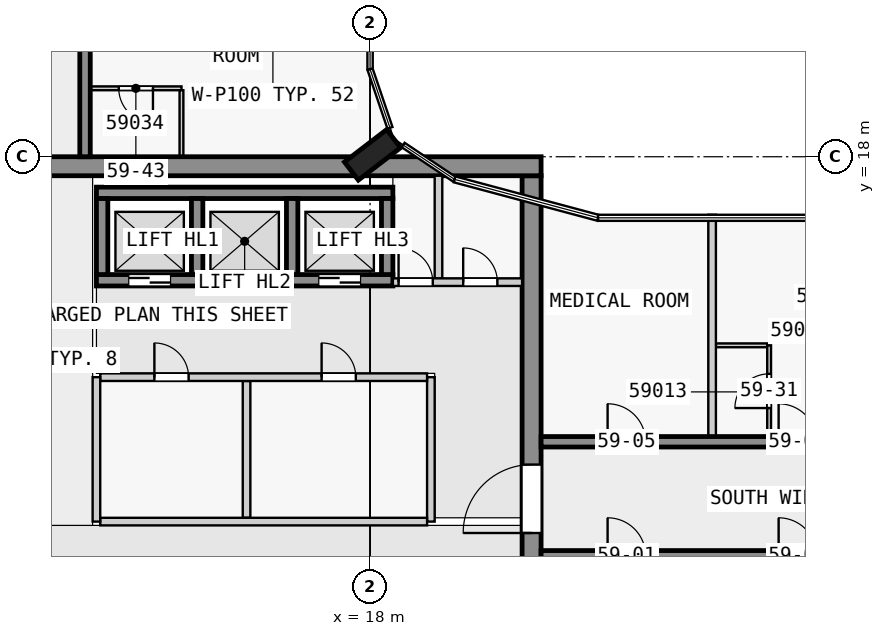
"""IFC4 building model, lengths in metres.
Left out: names, types, materials, properties, quantities, classifications, styles, units other than length and angle.
Written with IfcOpenShell. Run it as: python <this file> out.ifc"""

import sys

from ifc_helpers import new_model, si_unit, direction, frame, frame_2d, origin, origin_2d, place, context, subcontext, project, spatial, rectangle, extrude, element, fill, save


model = new_model("IFC4")
c1 = context("Model", 3, precision=1e-05, world=origin(), true_north=direction((0.0, 1.0)))
c2 = subcontext(c1, "Body", "Model", "MODEL_VIEW")
j1 = project(units=[si_unit("LENGTHUNIT", "METRE"), si_unit("PLANEANGLEUNIT", "RADIAN")], contexts=[c1])
p1 = place(None, origin())
s1 = spatial("IfcSite", under=j1, at=p1, CompositionType="ELEMENT")
p2 = place(p1, origin())
s2 = spatial("IfcBuilding", under=s1, at=p2, CompositionType="ELEMENT")
p3 = place(p2, frame((0.0, 0.0, 225.9)))
s3 = spatial("IfcBuildingStorey", under=s2, at=p3, CompositionType="ELEMENT", Elevation=225.9)
p4 = place(p3, frame((18.065, 18.05, 0.0), z_axis=(0.0, 0.0, 1.0), x_axis=(-0.608810846443, 0.793315418515, 0.0)))
e1 = element("IfcColumn", 1, at=p4, inside=s3, PredefinedType="COLUMN", context=c2, shape_type="SweptSolid", body=[
    extrude(rectangle(XDim=0.6, YDim=1.4, at=origin_2d()), origin(), (0.0, 0.0, 1.0), 3.5),
])
p5 = place(p3, frame((1.38, 17.75, 0.0), z_axis=(0.0, 0.0, 1.0), x_axis=(1.0, 0.0, 0.0)))
e2 = element("IfcWall", 2, at=p5, inside=s3, PredefinedType="SHEAR", context=c2, shape_type="SweptSolid", body=[
    extrude(rectangle(XDim=21.12, YDim=0.5, at=frame_2d((10.56, 0.0))), origin(), (0.0, 0.0, 1.0), 3.05),
])
p6 = place(p5, frame((6.3, 0.0, 0.0)))
e3 = element("IfcOpeningElement", 3, at=p6, cuts=e2, PredefinedType="OPENING", context=c2, shape_type="SweptSolid", body=[
    extrude(rectangle(XDim=1.8, YDim=2.1, at=frame_2d((0.9, 1.05))), frame((0.0, 0.26, 0.0), z_axis=(0.0, -1.0, 0.0), x_axis=(1.0, 0.0, 0.0)), (0.0, 0.0, 1.0), 0.52),
])
p7 = place(p3, frame((22.25, 2.5, 0.0), z_axis=(0.0, 0.0, 1.0), x_axis=(0.0, 1.0, 0.0)))
e4 = element("IfcWall", 4, at=p7, inside=s3, PredefinedType="SHEAR", context=c2, shape_type="SweptSolid", body=[
    extrude(rectangle(XDim=15.0, YDim=0.5, at=frame_2d((7.5, 0.0))), origin(), (0.0, 0.0, 1.0), 3.05),
])
p8 = place(p7, frame((5.6, 0.0, 0.0)))
e5 = element("IfcOpeningElement", 5, at=p8, cuts=e4, PredefinedType="OPENING", context=c2, shape_type="SweptSolid", body=[
    extrude(rectangle(XDim=1.8, YDim=2.1, at=frame_2d((0.9, 1.05))), frame((0.0, 0.26, 0.0), z_axis=(0.0, -1.0, 0.0), x_axis=(1.0, 0.0, 0.0)), (0.0, 0.0, 1.0), 0.52),
])
p9 = place(p3, frame((10.8, 17.05, 0.0), z_axis=(0.0, 0.0, 1.0), x_axis=(1.0, 0.0, 0.0)))
e6 = element("IfcWall", 6, at=p9, inside=s3, PredefinedType="SHEAR", context=c2, shape_type="SweptSolid", body=[
    extrude(rectangle(XDim=7.8, YDim=0.3, at=frame_2d((3.9, 0.0))), origin(), (0.0, 0.0, 1.0), 3.05),
])
p10 = place(p3, frame((10.8, 14.75, 0.0), z_axis=(0.0, 0.0, 1.0), x_axis=(1.0, 0.0, 0.0)))
e7 = element("IfcWall", 7, at=p10, inside=s3, PredefinedType="SHEAR", context=c2, shape_type="SweptSolid", body=[
    extrude(rectangle(XDim=7.8, YDim=0.3, at=frame_2d((3.9, 0.0))), origin(), (0.0, 0.0, 1.0), 3.05),
])
p11 = place(p10, frame((0.85, 0.0, 0.0)))
e8 = element("IfcOpeningElement", 8, at=p11, cuts=e7, PredefinedType="OPENING", context=c2, shape_type="SweptSolid", body=[
    extrude(rectangle(XDim=1.1, YDim=2.1, at=frame_2d((0.55, 1.05))), frame((0.0, 0.16, 0.0), z_axis=(0.0, -1.0, 0.0), x_axis=(1.0, 0.0, 0.0)), (0.0, 0.0, 1.0), 0.32),
])
p12 = place(p10, frame((3.35, 0.0, 0.0)))
e9 = element("IfcOpeningElement", 9, at=p12, cuts=e7, PredefinedType="OPENING", context=c2, shape_type="SweptSolid", body=[
    extrude(rectangle(XDim=1.1, YDim=2.1, at=frame_2d((0.55, 1.05))), frame((0.0, 0.16, 0.0), z_axis=(0.0, -1.0, 0.0), x_axis=(1.0, 0.0, 0.0)), (0.0, 0.0, 1.0), 0.32),
])
p13 = place(p10, frame((5.85, 0.0, 0.0)))
e10 = element("IfcOpeningElement", 10, at=p13, cuts=e7, PredefinedType="OPENING", context=c2, shape_type="SweptSolid", body=[
    extrude(rectangle(XDim=1.1, YDim=2.1, at=frame_2d((0.55, 1.05))), frame((0.0, 0.16, 0.0), z_axis=(0.0, -1.0, 0.0), x_axis=(1.0, 0.0, 0.0)), (0.0, 0.0, 1.0), 0.32),
])
for number, where, z_axis, x_axis in (
    (11, (10.95, 14.9, 0.0), (0.0, 0.0, 1.0), (0.0, 1.0, 0.0)),
    (12, (13.45, 14.9, 0.0), (0.0, 0.0, 1.0), (0.0, 1.0, 0.0)),
    (13, (15.95, 14.9, 0.0), (0.0, 0.0, 1.0), (0.0, 1.0, 0.0)),
    (14, (18.45, 14.9, 0.0), (0.0, 0.0, 1.0), (0.0, 1.0, 0.0)),
):
    element("IfcWall", number, at=place(p3, frame(where, z_axis=z_axis, x_axis=x_axis)), inside=s3, PredefinedType="SHEAR", context=c2, shape_type="SweptSolid", body=[
        extrude(rectangle(XDim=2.0, YDim=0.3, at=frame_2d((1.0, 0.0))), origin(), (0.0, 0.0, 1.0), 3.05),
    ])
p14 = place(p3, frame((22.5, 7.5, 0.0), z_axis=(0.0, 0.0, 1.0), x_axis=(1.0, 0.0, 0.0)))
e15 = element("IfcWall", 15, at=p14, inside=s3, PredefinedType="SHEAR", context=c2, shape_type="SweptSolid", body=[
    extrude(rectangle(XDim=22.5, YDim=0.275, at=frame_2d((11.25, 0.0))), origin(), (0.0, 0.0, 1.0), 3.05),
])
p15 = place(p14, frame((1.75, 0.0, 0.0)))
e16 = element("IfcOpeningElement", 16, at=p15, cuts=e15, PredefinedType="OPENING", context=c2, shape_type="SweptSolid", body=[
    extrude(rectangle(XDim=1.0, YDim=2.1, at=frame_2d((0.5, 1.05))), frame((0.0, 0.147, 0.0), z_axis=(0.0, -1.0, 0.0), x_axis=(1.0, 0.0, 0.0)), (0.0, 0.0, 1.0), 0.295),
])
p16 = place(p14, frame((6.25, 0.0, 0.0)))
e17 = element("IfcOpeningElement", 17, at=p16, cuts=e15, PredefinedType="OPENING", context=c2, shape_type="SweptSolid", body=[
    extrude(rectangle(XDim=1.0, YDim=2.1, at=frame_2d((0.5, 1.05))), frame((0.0, 0.147, 0.0), z_axis=(0.0, -1.0, 0.0), x_axis=(1.0, 0.0, 0.0)), (0.0, 0.0, 1.0), 0.295),
])
p17 = place(p14, frame((10.75, 0.0, 0.0)))
e18 = element("IfcOpeningElement", 18, at=p17, cuts=e15, PredefinedType="OPENING", context=c2, shape_type="SweptSolid", body=[
    extrude(rectangle(XDim=1.0, YDim=2.1, at=frame_2d((0.5, 1.05))), frame((0.0, 0.147, 0.0), z_axis=(0.0, -1.0, 0.0), x_axis=(1.0, 0.0, 0.0)), (0.0, 0.0, 1.0), 0.295),
])
p18 = place(p14, frame((16.85, 0.0, 0.0)))
e19 = element("IfcOpeningElement", 19, at=p18, cuts=e15, PredefinedType="OPENING", context=c2, shape_type="SweptSolid", body=[
    extrude(rectangle(XDim=1.0, YDim=2.1, at=frame_2d((0.5, 1.05))), frame((0.0, 0.147, 0.0), z_axis=(0.0, -1.0, 0.0), x_axis=(1.0, 0.0, 0.0)), (0.0, 0.0, 1.0), 0.295),
])
p19 = place(p3, frame((22.5, 10.5, 0.0), z_axis=(0.0, 0.0, 1.0), x_axis=(1.0, 0.0, 0.0)))
e20 = element("IfcWall", 20, at=p19, inside=s3, PredefinedType="SHEAR", context=c2, shape_type="SweptSolid", body=[
    extrude(rectangle(XDim=22.5, YDim=0.275, at=frame_2d((11.25, 0.0))), origin(), (0.0, 0.0, 1.0), 3.05),
])
p20 = place(p19, frame((1.75, 0.0, 0.0)))
e21 = element("IfcOpeningElement", 21, at=p20, cuts=e20, PredefinedType="OPENING", context=c2, shape_type="SweptSolid", body=[
    extrude(rectangle(XDim=1.0, YDim=2.1, at=frame_2d((0.5, 1.05))), frame((0.0, 0.147, 0.0), z_axis=(0.0, -1.0, 0.0), x_axis=(1.0, 0.0, 0.0)), (0.0, 0.0, 1.0), 0.295),
])
p21 = place(p19, frame((6.25, 0.0, 0.0)))
e22 = element("IfcOpeningElement", 22, at=p21, cuts=e20, PredefinedType="OPENING", context=c2, shape_type="SweptSolid", body=[
    extrude(rectangle(XDim=1.0, YDim=2.1, at=frame_2d((0.5, 1.05))), frame((0.0, 0.147, 0.0), z_axis=(0.0, -1.0, 0.0), x_axis=(1.0, 0.0, 0.0)), (0.0, 0.0, 1.0), 0.295),
])
p22 = place(p19, frame((10.35, 0.0, 0.0)))
e23 = element("IfcOpeningElement", 23, at=p22, cuts=e20, PredefinedType="OPENING", context=c2, shape_type="SweptSolid", body=[
    extrude(rectangle(XDim=1.8, YDim=2.1, at=frame_2d((0.9, 1.05))), frame((0.0, 0.147, 0.0), z_axis=(0.0, -1.0, 0.0), x_axis=(1.0, 0.0, 0.0)), (0.0, 0.0, 1.0), 0.295),
])
p23 = place(p19, frame((15.25, 0.0, 0.0)))
e24 = element("IfcOpeningElement", 24, at=p23, cuts=e20, PredefinedType="OPENING", context=c2, shape_type="SweptSolid", body=[
    extrude(rectangle(XDim=1.0, YDim=2.1, at=frame_2d((0.5, 1.05))), frame((0.0, 0.147, 0.0), z_axis=(0.0, -1.0, 0.0), x_axis=(1.0, 0.0, 0.0)), (0.0, 0.0, 1.0), 0.295),
])
p24 = place(p19, frame((18.75, 0.0, 0.0)))
e25 = element("IfcOpeningElement", 25, at=p24, cuts=e20, PredefinedType="OPENING", context=c2, shape_type="SweptSolid", body=[
    extrude(rectangle(XDim=0.9, YDim=2.1, at=frame_2d((0.45, 1.05))), frame((0.0, 0.147, 0.0), z_axis=(0.0, -1.0, 0.0), x_axis=(1.0, 0.0, 0.0)), (0.0, 0.0, 1.0), 0.295),
])
p25 = place(p19, frame((20.95, 0.0, 0.0)))
e26 = element("IfcOpeningElement", 26, at=p25, cuts=e20, PredefinedType="OPENING", context=c2, shape_type="SweptSolid", body=[
    extrude(rectangle(XDim=1.0, YDim=2.1, at=frame_2d((0.5, 1.05))), frame((0.0, 0.147, 0.0), z_axis=(0.0, -1.0, 0.0), x_axis=(1.0, 0.0, 0.0)), (0.0, 0.0, 1.0), 0.295),
])
p26 = place(p3, frame((10.5, 18.0, 0.0), z_axis=(0.0, 0.0, 1.0), x_axis=(0.0, 1.0, 0.0)))
e27 = element("IfcWall", 27, at=p26, inside=s3, PredefinedType="SHEAR", context=c2, shape_type="SweptSolid", body=[
    extrude(rectangle(XDim=27.0, YDim=0.275, at=frame_2d((13.5, 0.0))), origin(), (0.0, 0.0, 1.0), 3.05),
])
p27 = place(p26, frame((4.05, 0.0, 0.0)))
e28 = element("IfcOpeningElement", 28, at=p27, cuts=e27, PredefinedType="OPENING", context=c2, shape_type="SweptSolid", body=[
    extrude(rectangle(XDim=1.0, YDim=2.1, at=frame_2d((0.5, 1.05))), frame((0.0, 0.147, 0.0), z_axis=(0.0, -1.0, 0.0), x_axis=(1.0, 0.0, 0.0)), (0.0, 0.0, 1.0), 0.295),
])
p28 = place(p26, frame((10.35, 0.0, 0.0)))
e29 = element("IfcOpeningElement", 29, at=p28, cuts=e27, PredefinedType="OPENING", context=c2, shape_type="SweptSolid", body=[
    extrude(rectangle(XDim=1.8, YDim=2.1, at=frame_2d((0.9, 1.05))), frame((0.0, 0.147, 0.0), z_axis=(0.0, -1.0, 0.0), x_axis=(1.0, 0.0, 0.0)), (0.0, 0.0, 1.0), 0.295),
])
p29 = place(p26, frame((15.25, 0.0, 0.0)))
e30 = element("IfcOpeningElement", 30, at=p29, cuts=e27, PredefinedType="OPENING", context=c2, shape_type="SweptSolid", body=[
    extrude(rectangle(XDim=1.0, YDim=2.1, at=frame_2d((0.5, 1.05))), frame((0.0, 0.147, 0.0), z_axis=(0.0, -1.0, 0.0), x_axis=(1.0, 0.0, 0.0)), (0.0, 0.0, 1.0), 0.295),
])
p30 = place(p26, frame((21.35, 0.0, 0.0)))
e31 = element("IfcOpeningElement", 31, at=p30, cuts=e27, PredefinedType="OPENING", context=c2, shape_type="SweptSolid", body=[
    extrude(rectangle(XDim=1.0, YDim=2.1, at=frame_2d((0.5, 1.05))), frame((0.0, 0.147, 0.0), z_axis=(0.0, -1.0, 0.0), x_axis=(1.0, 0.0, 0.0)), (0.0, 0.0, 1.0), 0.295),
])
p31 = place(p3, frame((10.8, 8.4, 0.0), z_axis=(0.0, 0.0, 1.0), x_axis=(0.0, 1.0, 0.0)))
e32 = element("IfcWall", 32, at=p31, inside=s3, PredefinedType="PARTITIONING", context=c2, shape_type="SweptSolid", body=[
    extrude(rectangle(XDim=3.8, YDim=0.2, at=frame_2d((1.9, 0.0))), origin(), (0.0, 0.0, 1.0), 3.05),
])
p32 = place(p3, frame((10.9, 8.4, 0.0), z_axis=(0.0, 0.0, 1.0), x_axis=(1.0, 0.0, 0.0)))
e33 = element("IfcWall", 33, at=p32, inside=s3, PredefinedType="PARTITIONING", context=c2, shape_type="SweptSolid", body=[
    extrude(rectangle(XDim=8.6, YDim=0.2, at=frame_2d((4.3, 0.0))), origin(), (0.0, 0.0, 1.0), 3.05),
])
p33 = place(p3, frame((19.6, 8.4, 0.0), z_axis=(0.0, 0.0, 1.0), x_axis=(0.0, 1.0, 0.0)))
e34 = element("IfcWall", 34, at=p33, inside=s3, PredefinedType="PARTITIONING", context=c2, shape_type="SweptSolid", body=[
    extrude(rectangle(XDim=3.8, YDim=0.2, at=frame_2d((1.9, 0.0))), origin(), (0.0, 0.0, 1.0), 3.05),
])
p34 = place(p3, frame((10.9, 12.2, 0.0), z_axis=(0.0, 0.0, 1.0), x_axis=(1.0, 0.0, 0.0)))
e35 = element("IfcWall", 35, at=p34, inside=s3, PredefinedType="PARTITIONING", context=c2, shape_type="SweptSolid", body=[
    extrude(rectangle(XDim=8.6, YDim=0.2, at=frame_2d((4.3, 0.0))), origin(), (0.0, 0.0, 1.0), 3.05),
])
p35 = place(p34, frame((1.425, 0.0, 0.0)))
e36 = element("IfcOpeningElement", 36, at=p35, cuts=e35, PredefinedType="OPENING", context=c2, shape_type="SweptSolid", body=[
    extrude(rectangle(XDim=0.9, YDim=2.1, at=frame_2d((0.45, 1.05))), frame((0.0, 0.11, 0.0), z_axis=(0.0, -1.0, 0.0), x_axis=(1.0, 0.0, 0.0)), (0.0, 0.0, 1.0), 0.22),
])
p36 = place(p34, frame((5.825, 0.0, 0.0)))
e37 = element("IfcOpeningElement", 37, at=p36, cuts=e35, PredefinedType="OPENING", context=c2, shape_type="SweptSolid", body=[
    extrude(rectangle(XDim=0.9, YDim=2.1, at=frame_2d((0.45, 1.05))), frame((0.0, 0.11, 0.0), z_axis=(0.0, -1.0, 0.0), x_axis=(1.0, 0.0, 0.0)), (0.0, 0.0, 1.0), 0.22),
])
p37 = place(p3, frame((14.75, 8.5, 0.0), z_axis=(0.0, 0.0, 1.0), x_axis=(0.0, 1.0, 0.0)))
e38 = element("IfcWall", 38, at=p37, inside=s3, PredefinedType="PARTITIONING", context=c2, shape_type="SweptSolid", body=[
    extrude(rectangle(XDim=3.6, YDim=0.2, at=frame_2d((1.8, 0.0))), origin(), (0.0, 0.0, 1.0), 3.05),
])
p38 = place(p3, frame((18.6, 14.7, 0.0), z_axis=(0.0, 0.0, 1.0), x_axis=(1.0, 0.0, 0.0)))
e39 = element("IfcWall", 39, at=p38, inside=s3, PredefinedType="PARTITIONING", context=c2, shape_type="SweptSolid", body=[
    extrude(rectangle(XDim=3.4, YDim=0.2, at=frame_2d((1.7, 0.0))), origin(), (0.0, 0.0, 1.0), 3.05),
])
p39 = place(p38, frame((0.15, 0.0, 0.0)))
e40 = element("IfcOpeningElement", 40, at=p39, cuts=e39, PredefinedType="OPENING", context=c2, shape_type="SweptSolid", body=[
    extrude(rectangle(XDim=0.9, YDim=2.1, at=frame_2d((0.45, 1.05))), frame((0.0, 0.11, 0.0), z_axis=(0.0, -1.0, 0.0), x_axis=(1.0, 0.0, 0.0)), (0.0, 0.0, 1.0), 0.22),
])
p40 = place(p38, frame((1.85, 0.0, 0.0)))
e41 = element("IfcOpeningElement", 41, at=p40, cuts=e39, PredefinedType="OPENING", context=c2, shape_type="SweptSolid", body=[
    extrude(rectangle(XDim=0.9, YDim=2.1, at=frame_2d((0.45, 1.05))), frame((0.0, 0.11, 0.0), z_axis=(0.0, -1.0, 0.0), x_axis=(1.0, 0.0, 0.0)), (0.0, 0.0, 1.0), 0.22),
])
p41 = place(p3, frame((19.8, 14.8, 0.0), z_axis=(0.0, 0.0, 1.0), x_axis=(0.0, 1.0, 0.0)))
e42 = element("IfcWall", 42, at=p41, inside=s3, PredefinedType="PARTITIONING", context=c2, shape_type="SweptSolid", body=[
    extrude(rectangle(XDim=2.7, YDim=0.2, at=frame_2d((1.35, 0.0))), origin(), (0.0, 0.0, 1.0), 3.05),
])
p42 = place(p3, frame((28.45, 13.038, 0.0), z_axis=(0.0, 0.0, 1.0), x_axis=(-1.0, 0.0, 0.0)))
e43 = element("IfcWall", 43, at=p42, inside=s3, PredefinedType="PARTITIONING", context=c2, shape_type="SweptSolid", body=[
    extrude(rectangle(XDim=1.35, YDim=0.1, at=frame_2d((0.675, 0.0))), origin(), (0.0, 0.0, 1.0), 3.05),
])
p43 = place(p3, frame((13.038, 19.8, 0.0), z_axis=(0.0, 0.0, 1.0), x_axis=(-1.0, 0.0, 0.0)))
e44 = element("IfcWall", 44, at=p43, inside=s3, PredefinedType="PARTITIONING", context=c2, shape_type="SweptSolid", body=[
    extrude(rectangle(XDim=2.4, YDim=0.1, at=frame_2d((1.2, 0.0))), origin(), (0.0, 0.0, 1.0), 3.05),
])
p44 = place(p43, frame((0.75, 0.0, 0.0)))
e45 = element("IfcOpeningElement", 45, at=p44, cuts=e44, PredefinedType="OPENING", context=c2, shape_type="SweptSolid", body=[
    extrude(rectangle(XDim=0.9, YDim=2.1, at=frame_2d((0.45, 1.05))), frame((0.0, 0.06, 0.0), z_axis=(0.0, -1.0, 0.0), x_axis=(1.0, 0.0, 0.0)), (0.0, 0.0, 1.0), 0.12),
])
p45 = place(p3, frame((13.038, 18.0, 0.0), z_axis=(0.0, 0.0, 1.0), x_axis=(0.0, 1.0, 0.0)))
e46 = element("IfcWall", 46, at=p45, inside=s3, PredefinedType="PARTITIONING", context=c2, shape_type="SweptSolid", body=[
    extrude(rectangle(XDim=1.75, YDim=0.1, at=frame_2d((0.875, 0.0))), origin(), (0.0, 0.0, 1.0), 3.05),
])
p46 = place(p3, frame((27.0, 10.637, 0.0), z_axis=(0.0, 0.0, 1.0), x_axis=(0.0, 1.0, 0.0)))
e47 = element("IfcWall", 47, at=p46, inside=s3, PredefinedType="PARTITIONING", context=c2, shape_type="SweptSolid", body=[
    extrude(rectangle(XDim=5.836, YDim=0.2, at=frame_2d((2.918, 0.0))), origin(), (0.0, 0.0, 1.0), 3.05),
])
p47 = place(p3, frame((28.5, 10.637, 0.0), z_axis=(0.0, 0.0, 1.0), x_axis=(0.0, 1.0, 0.0)))
e48 = element("IfcWall", 48, at=p47, inside=s3, PredefinedType="PARTITIONING", context=c2, shape_type="SweptSolid", body=[
    extrude(rectangle(XDim=2.4, YDim=0.1, at=frame_2d((1.2, 0.0))), origin(), (0.0, 0.0, 1.0), 3.05),
])
p48 = place(p47, frame((0.75, 0.0, 0.0)))
e49 = element("IfcOpeningElement", 49, at=p48, cuts=e48, PredefinedType="OPENING", context=c2, shape_type="SweptSolid", body=[
    extrude(rectangle(XDim=0.9, YDim=2.1, at=frame_2d((0.45, 1.05))), frame((0.0, 0.06, 0.0), z_axis=(0.0, -1.0, 0.0), x_axis=(1.0, 0.0, 0.0)), (0.0, 0.0, 1.0), 0.12),
])
p49 = place(p35, origin())
e50 = element("IfcDoor", 50, at=p49, inside=s3, OperationType="SINGLE_SWING_LEFT", PredefinedType="DOOR", context=c2, shape_type="SweptSolid", body=[
    extrude(rectangle(XDim=0.9, YDim=2.1, at=frame_2d((0.45, 1.05))), frame((0.0, 0.025, 0.0), z_axis=(0.0, -1.0, 0.0), x_axis=(1.0, 0.0, 0.0)), (0.0, 0.0, 1.0), 0.05),
])
fill(e36, e50)
p50 = place(p36, origin())
e51 = element("IfcDoor", 51, at=p50, inside=s3, OperationType="SINGLE_SWING_LEFT", PredefinedType="DOOR", context=c2, shape_type="SweptSolid", body=[
    extrude(rectangle(XDim=0.9, YDim=2.1, at=frame_2d((0.45, 1.05))), frame((0.0, 0.025, 0.0), z_axis=(0.0, -1.0, 0.0), x_axis=(1.0, 0.0, 0.0)), (0.0, 0.0, 1.0), 0.05),
])
fill(e37, e51)
p51 = place(p11, origin())
e52 = element("IfcDoor", 52, at=p51, inside=s3, OperationType="DOUBLE_DOOR_SLIDING", PredefinedType="DOOR", context=c2, shape_type="SweptSolid", body=[
    extrude(rectangle(XDim=1.1, YDim=2.1, at=frame_2d((0.55, 1.05))), frame((0.0, 0.025, 0.0), z_axis=(0.0, -1.0, 0.0), x_axis=(1.0, 0.0, 0.0)), (0.0, 0.0, 1.0), 0.05),
])
fill(e8, e52)
p52 = place(p12, origin())
e53 = element("IfcDoor", 53, at=p52, inside=s3, OperationType="DOUBLE_DOOR_SLIDING", PredefinedType="DOOR", context=c2, shape_type="SweptSolid", body=[
    extrude(rectangle(XDim=1.1, YDim=2.1, at=frame_2d((0.55, 1.05))), frame((0.0, 0.025, 0.0), z_axis=(0.0, -1.0, 0.0), x_axis=(1.0, 0.0, 0.0)), (0.0, 0.0, 1.0), 0.05),
])
fill(e9, e53)
p53 = place(p13, origin())
e54 = element("IfcDoor", 54, at=p53, inside=s3, OperationType="DOUBLE_DOOR_SLIDING", PredefinedType="DOOR", context=c2, shape_type="SweptSolid", body=[
    extrude(rectangle(XDim=1.1, YDim=2.1, at=frame_2d((0.55, 1.05))), frame((0.0, 0.025, 0.0), z_axis=(0.0, -1.0, 0.0), x_axis=(1.0, 0.0, 0.0)), (0.0, 0.0, 1.0), 0.05),
])
fill(e10, e54)
p54 = place(p8, origin())
e55 = element("IfcDoor", 55, at=p54, inside=s3, OperationType="DOUBLE_DOOR_SINGLE_SWING", PredefinedType="DOOR", context=c2, shape_type="SweptSolid", body=[
    extrude(rectangle(XDim=1.8, YDim=2.1, at=frame_2d((0.9, 1.05))), frame((0.0, 0.025, 0.0), z_axis=(0.0, -1.0, 0.0), x_axis=(1.0, 0.0, 0.0)), (0.0, 0.0, 1.0), 0.05),
])
fill(e5, e55)
p55 = place(p39, origin())
e56 = element("IfcDoor", 56, at=p55, inside=s3, OperationType="SINGLE_SWING_LEFT", PredefinedType="DOOR", context=c2, shape_type="SweptSolid", body=[
    extrude(rectangle(XDim=0.9, YDim=2.1, at=frame_2d((0.45, 1.05))), frame((0.0, 0.025, 0.0), z_axis=(0.0, -1.0, 0.0), x_axis=(1.0, 0.0, 0.0)), (0.0, 0.0, 1.0), 0.05),
])
fill(e40, e56)
p56 = place(p40, origin())
e57 = element("IfcDoor", 57, at=p56, inside=s3, OperationType="SINGLE_SWING_LEFT", PredefinedType="DOOR", context=c2, shape_type="SweptSolid", body=[
    extrude(rectangle(XDim=0.9, YDim=2.1, at=frame_2d((0.45, 1.05))), frame((0.0, 0.025, 0.0), z_axis=(0.0, -1.0, 0.0), x_axis=(1.0, 0.0, 0.0)), (0.0, 0.0, 1.0), 0.05),
])
fill(e41, e57)
p57 = place(p15, origin())
e58 = element("IfcDoor", 58, at=p57, inside=s3, OperationType="SINGLE_SWING_LEFT", PredefinedType="DOOR", context=c2, shape_type="SweptSolid", body=[
    extrude(rectangle(XDim=1.0, YDim=2.1, at=frame_2d((0.5, 1.05))), frame((0.0, 0.025, 0.0), z_axis=(0.0, -1.0, 0.0), x_axis=(1.0, 0.0, 0.0)), (0.0, 0.0, 1.0), 0.05),
])
fill(e16, e58)
p58 = place(p16, origin())
e59 = element("IfcDoor", 59, at=p58, inside=s3, OperationType="SINGLE_SWING_LEFT", PredefinedType="DOOR", context=c2, shape_type="SweptSolid", body=[
    extrude(rectangle(XDim=1.0, YDim=2.1, at=frame_2d((0.5, 1.05))), frame((0.0, 0.025, 0.0), z_axis=(0.0, -1.0, 0.0), x_axis=(1.0, 0.0, 0.0)), (0.0, 0.0, 1.0), 0.05),
])
fill(e17, e59)
p59 = place(p20, origin())
e60 = element("IfcDoor", 60, at=p59, inside=s3, OperationType="SINGLE_SWING_LEFT", PredefinedType="DOOR", context=c2, shape_type="SweptSolid", body=[
    extrude(rectangle(XDim=1.0, YDim=2.1, at=frame_2d((0.5, 1.05))), frame((0.0, 0.025, 0.0), z_axis=(0.0, -1.0, 0.0), x_axis=(1.0, 0.0, 0.0)), (0.0, 0.0, 1.0), 0.05),
])
fill(e21, e60)
p60 = place(p21, origin())
e61 = element("IfcDoor", 61, at=p60, inside=s3, OperationType="SINGLE_SWING_LEFT", PredefinedType="DOOR", context=c2, shape_type="SweptSolid", body=[
    extrude(rectangle(XDim=1.0, YDim=2.1, at=frame_2d((0.5, 1.05))), frame((0.0, 0.025, 0.0), z_axis=(0.0, -1.0, 0.0), x_axis=(1.0, 0.0, 0.0)), (0.0, 0.0, 1.0), 0.05),
])
fill(e22, e61)
p61 = place(p48, origin())
e62 = element("IfcDoor", 62, at=p61, inside=s3, OperationType="SINGLE_SWING_LEFT", PredefinedType="DOOR", context=c2, shape_type="SweptSolid", body=[
    extrude(rectangle(XDim=0.9, YDim=2.1, at=frame_2d((0.45, 1.05))), frame((0.0, 0.025, 0.0), z_axis=(0.0, -1.0, 0.0), x_axis=(1.0, 0.0, 0.0)), (0.0, 0.0, 1.0), 0.05),
])
fill(e49, e62)
p62 = place(p44, origin())
e63 = element("IfcDoor", 63, at=p62, inside=s3, OperationType="SINGLE_SWING_LEFT", PredefinedType="DOOR", context=c2, shape_type="SweptSolid", body=[
    extrude(rectangle(XDim=0.9, YDim=2.1, at=frame_2d((0.45, 1.05))), frame((0.0, 0.025, 0.0), z_axis=(0.0, -1.0, 0.0), x_axis=(1.0, 0.0, 0.0)), (0.0, 0.0, 1.0), 0.05),
])
fill(e45, e63)
save(model, sys.argv[1])
